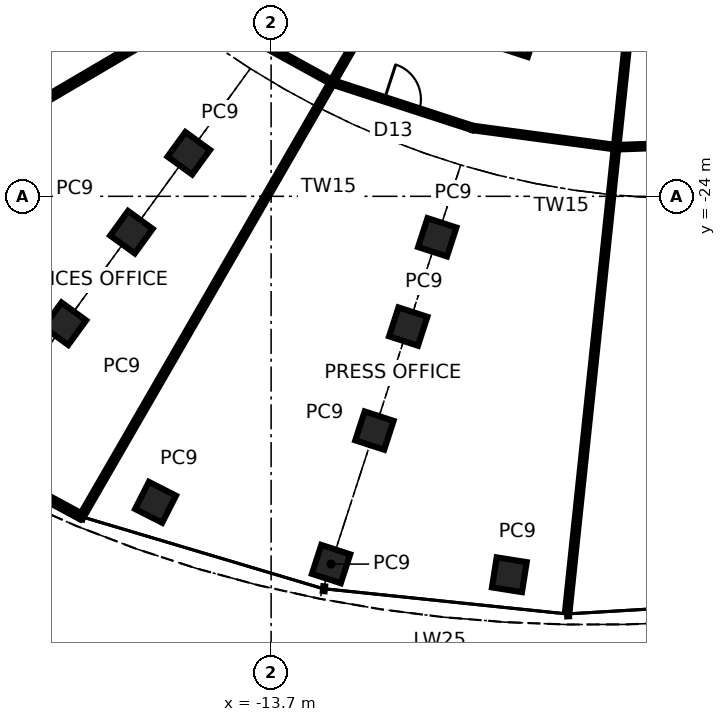
"""IFC4 building model, lengths in metres.
Left out: names, types, materials, properties, quantities, classifications, styles, units other than length and angle.
Written with IfcOpenShell. Run it as: python <this file> out.ifc"""

import sys

from ifc_helpers import new_model, si_unit, direction, frame, frame_2d, origin, origin_2d, place, context, subcontext, project, spatial, rectangle, extrude, element, fill, save


model = new_model("IFC4")
c1 = context("Model", 3, precision=1e-05, world=origin(), true_north=direction((0.0, 1.0)))
c2 = subcontext(c1, "Body", "Model", "MODEL_VIEW")
j1 = project(units=[si_unit("LENGTHUNIT", "METRE"), si_unit("PLANEANGLEUNIT", "RADIAN")], contexts=[c1])
p1 = place(None, origin())
s1 = spatial("IfcSite", under=j1, at=p1, CompositionType="ELEMENT")
p2 = place(p1, origin())
s2 = spatial("IfcBuilding", under=s1, at=p2, CompositionType="ELEMENT")
p3 = place(p2, origin())
s3 = spatial("IfcBuildingStorey", under=s2, at=p3, CompositionType="ELEMENT", Elevation=0.0)
p4 = place(p3, frame((-5.9, -18.157, 0.0), z_axis=(0.0, 0.0, 1.0), x_axis=(-0.309016994375, -0.951056516295, 0.0)))
e1 = element("IfcColumn", 1, at=p4, inside=s3, PredefinedType="COLUMN", context=c2, shape_type="SweptSolid", body=[
    extrude(rectangle(XDim=2.0, YDim=2.0, at=origin_2d()), origin(), (0.0, 0.0, 1.0), 5.6),
])
for number, where, z_axis, x_axis in (
    (2, (-17.502, -34.066, 0.0), (0.0, 0.0, 1.0), (-0.454, -0.891, 0.0)),
    (3, (-11.729, -36.097, 0.0), (0.0, 0.0, 1.0), (-0.309, -0.951, 0.0)),
    (4, (-5.864, -36.449, 0.0), (0.0, 0.0, 1.0), (-0.156, -0.988, 0.0)),
    (5, (-20.483, -28.192, 0.0), (0.0, 0.0, 1.0), (-0.588, -0.809, 0.0)),
    (6, (-10.302, -31.706, 0.0), (0.0, 0.0, 1.0), (-0.309, -0.951, 0.0)),
    (7, (-18.294, -25.18, 0.0), (0.0, 0.0, 1.0), (-0.588, -0.809, 0.0)),
    (8, (-9.19, -28.285, 0.0), (0.0, 0.0, 1.0), (-0.309, -0.951, 0.0)),
    (9, (-16.409, -22.584, 0.0), (0.0, 0.0, 1.0), (-0.588, -0.809, 0.0)),
    (10, (-8.236, -25.347, 0.0), (0.0, 0.0, 1.0), (-0.309, -0.951, 0.0)),
):
    element("IfcColumn", number, at=place(p3, frame(where, z_axis=z_axis, x_axis=x_axis)), inside=s3, PredefinedType="COLUMN", context=c2, shape_type="SweptSolid", body=[
        extrude(rectangle(XDim=1.0, YDim=1.0, at=origin_2d()), origin(), (0.0, 0.0, 1.0), 5.6),
    ])
p5 = place(p3, frame((-27.443, -30.479, 0.0), z_axis=(0.0, 0.0, 1.0), x_axis=(0.879579965321, -0.475751074204, 0.0)))
e11 = element("IfcWall", 11, at=p5, inside=s3, PredefinedType="SOLIDWALL", context=c2, shape_type="SweptSolid", body=[
    extrude(rectangle(XDim=8.531, YDim=0.2, at=frame_2d((4.265, 0.0))), origin(), (0.0, 0.0, 1.0), 5.4),
])
p6 = place(p5, frame((0.4, 0.0, 0.0)))
e12 = element("IfcOpeningElement", 12, at=p6, cuts=e11, PredefinedType="OPENING", context=c2, shape_type="SweptSolid", body=[
    extrude(rectangle(XDim=1.8, YDim=2.7, at=frame_2d((0.9, 1.35))), frame((0.0, 0.11, 0.0), z_axis=(0.0, -1.0, 0.0), x_axis=(1.0, 0.0, 0.0)), (0.0, 0.0, 1.0), 0.22),
])
p7 = place(p5, frame((2.4, 0.0, 0.3)))
e13 = element("IfcOpeningElement", 13, at=p7, cuts=e11, PredefinedType="OPENING", context=c2, shape_type="SweptSolid", body=[
    extrude(rectangle(XDim=1.2, YDim=2.4, at=frame_2d((0.6, 1.2))), frame((0.0, 0.11, 0.0), z_axis=(0.0, -1.0, 0.0), x_axis=(1.0, 0.0, 0.0)), (0.0, 0.0, 1.0), 0.22),
])
p8 = place(p5, frame((0.4, 0.0, 3.0)))
e14 = element("IfcOpeningElement", 14, at=p8, cuts=e11, PredefinedType="OPENING", context=c2, shape_type="SweptSolid", body=[
    extrude(rectangle(XDim=1.8, YDim=0.9, at=frame_2d((0.9, 0.45))), frame((0.0, 0.11, 0.0), z_axis=(0.0, -1.0, 0.0), x_axis=(1.0, 0.0, 0.0)), (0.0, 0.0, 1.0), 0.22),
])
p9 = place(p3, frame((-14.2, -10.317, 0.0), z_axis=(0.0, 0.0, 1.0), x_axis=(-0.809015878867, -0.587786787654, 0.0)))
e15 = element("IfcWall", 15, at=p9, inside=s3, PredefinedType="SOLIDWALL", context=c2, shape_type="SweptSolid", body=[
    extrude(rectangle(XDim=24.443, YDim=0.19, at=frame_2d((12.221, 0.0))), origin(), (0.0, 0.0, 1.0), 4.2),
])
p10 = place(p3, frame((-31.645, -27.002, 0.0), z_axis=(0.0, 0.0, 1.0), x_axis=(0.862003297089, 0.506902668969, 0.0)))
e16 = element("IfcWall", 16, at=p10, inside=s3, PredefinedType="SOLIDWALL", context=c2, shape_type="SweptSolid", body=[
    extrude(rectangle(XDim=18.077, YDim=0.19, at=frame_2d((9.039, 0.0))), origin(), (0.0, 0.0, 1.0), 5.4),
])
p11 = place(p3, frame((-16.062, -17.839, 0.0), z_axis=(0.0, 0.0, 1.0), x_axis=(0.875641162684, -0.482962269968, 0.0)))
e17 = element("IfcWall", 17, at=p11, inside=s3, PredefinedType="PARTITIONING", context=c2, shape_type="SweptSolid", body=[
    extrude(rectangle(XDim=4.992, YDim=0.15, at=frame_2d((2.496, 0.0))), origin(), (0.0, 0.0, 1.0), 5.4),
])
p12 = place(p3, frame((-6.524, -11.3, 0.0), z_axis=(0.0, 0.0, 1.0), x_axis=(-0.499999476762, -0.866025705876, 0.0)))
e18 = element("IfcWall", 18, at=p12, inside=s3, PredefinedType="PARTITIONING", context=c2, shape_type="SweptSolid", body=[
    extrude(rectangle(XDim=26.751, YDim=0.15, at=frame_2d((13.376, 0.0))), origin(), (0.0, 0.0, 1.0), 5.4),
])
p13 = place(p3, frame((-11.691, -20.25, 0.0), z_axis=(0.0, 0.0, 1.0), x_axis=(0.951027056342, -0.309107648085, 0.0)))
e19 = element("IfcWall", 19, at=p13, inside=s3, PredefinedType="PARTITIONING", context=c2, shape_type="SweptSolid", body=[
    extrude(rectangle(XDim=4.861, YDim=0.15, at=frame_2d((2.431, 0.0))), origin(), (0.0, 0.0, 1.0), 5.4),
])
p14 = place(p13, frame((1.806, 0.0, 0.0)))
e20 = element("IfcOpeningElement", 20, at=p14, cuts=e19, PredefinedType="OPENING", context=c2, shape_type="SweptSolid", body=[
    extrude(rectangle(XDim=1.2, YDim=2.4, at=frame_2d((0.6, 1.2))), frame((0.0, 0.085, 0.0), z_axis=(0.0, -1.0, 0.0), x_axis=(1.0, 0.0, 0.0)), (0.0, 0.0, 1.0), 0.17),
])
p15 = place(p3, frame((-7.068, -21.752, 0.0), z_axis=(0.0, 0.0, 1.0), x_axis=(0.991085698144, -0.133225894386, 0.0)))
e21 = element("IfcWall", 21, at=p15, inside=s3, PredefinedType="PARTITIONING", context=c2, shape_type="SweptSolid", body=[
    extrude(rectangle(XDim=4.757, YDim=0.15, at=frame_2d((2.379, 0.0))), origin(), (0.0, 0.0, 1.0), 5.4),
])
p16 = place(p3, frame((-1.188, -11.3, 0.0), z_axis=(0.0, 0.0, 1.0), x_axis=(-0.104527978189, -0.994521946352, 0.0)))
e22 = element("IfcWall", 22, at=p16, inside=s3, PredefinedType="PARTITIONING", context=c2, shape_type="SweptSolid", body=[
    extrude(rectangle(XDim=26.503, YDim=0.15, at=frame_2d((13.251, 0.0))), origin(), (0.0, 0.0, 1.0), 5.4),
])
p17 = place(p3, frame((-2.353, -22.386, 0.0), z_axis=(0.0, 0.0, 1.0), x_axis=(0.999373614835, 0.035388952668, 0.0)))
e23 = element("IfcWall", 23, at=p17, inside=s3, PredefinedType="PARTITIONING", context=c2, shape_type="SweptSolid", body=[
    extrude(rectangle(XDim=4.691, YDim=0.15, at=frame_2d((2.346, 0.0))), origin(), (0.0, 0.0, 1.0), 5.4),
])
p18 = place(p14, origin())
e24 = element("IfcDoor", 24, at=p18, inside=s3, OperationType="SINGLE_SWING_LEFT", PredefinedType="DOOR", context=c2, shape_type="SweptSolid", body=[
    extrude(rectangle(XDim=1.2, YDim=2.4, at=frame_2d((0.6, 1.2))), frame((0.0, 0.025, 0.0), z_axis=(0.0, -1.0, 0.0), x_axis=(1.0, 0.0, 0.0)), (0.0, 0.0, 1.0), 0.05),
])
fill(e20, e24)
save(model, sys.argv[1])
